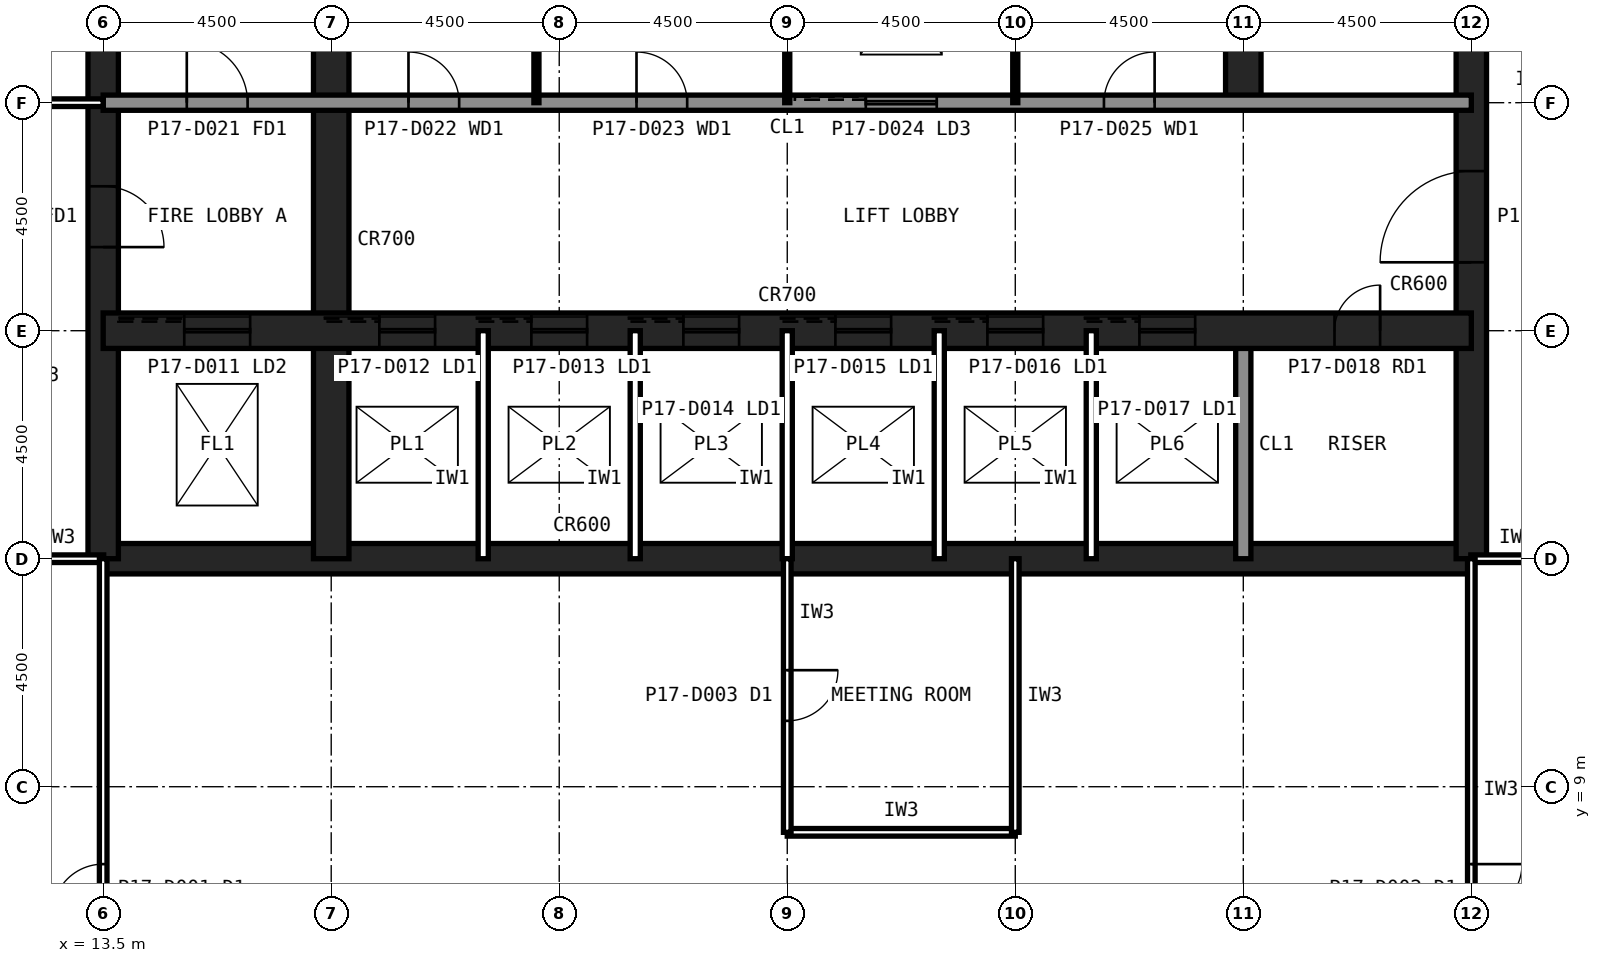
"""IFC4 building model, lengths in metres.
Left out: names, types, materials, properties, quantities, classifications, styles, units other than length and angle.
Written with IfcOpenShell. Run it as: python <this file> out.ifc"""

import sys

from ifc_helpers import new_model, si_unit, direction, frame, frame_2d, origin, place, context, subcontext, project, spatial, rectangle, extrude, element, fill, save


model = new_model("IFC4")
c1 = context("Model", 3, precision=1e-05, world=origin(), true_north=direction((0.0, 1.0)))
c2 = subcontext(c1, "Body", "Model", "MODEL_VIEW")
j1 = project(units=[si_unit("LENGTHUNIT", "METRE"), si_unit("PLANEANGLEUNIT", "RADIAN")], contexts=[c1])
p1 = place(None, origin())
s1 = spatial("IfcSite", under=j1, at=p1, CompositionType="ELEMENT")
p2 = place(p1, origin())
s2 = spatial("IfcBuilding", under=s1, at=p2, CompositionType="ELEMENT")
p3 = place(p2, frame((0.0, 0.0, 71.0)))
s3 = spatial("IfcBuildingStorey", under=s2, at=p3, CompositionType="ELEMENT", Elevation=71.0)
p4 = place(p3, frame((13.5, 13.5, 0.0), z_axis=(0.0, 0.0, 1.0), x_axis=(1.0, 0.0, 0.0)))
e1 = element("IfcWall", 1, at=p4, inside=s3, PredefinedType="SHEAR", context=c2, shape_type="SweptSolid", body=[
    extrude(rectangle(XDim=27.0, YDim=0.6, at=frame_2d((13.5, 0.0))), origin(), (0.0, 0.0, 1.0), 4.2),
])
p5 = place(p3, frame((40.5, 13.5, 0.0), z_axis=(0.0, 0.0, 1.0), x_axis=(0.0, 1.0, 0.0)))
e2 = element("IfcWall", 2, at=p5, inside=s3, PredefinedType="SHEAR", context=c2, shape_type="SweptSolid", body=[
    extrude(rectangle(XDim=27.0, YDim=0.6, at=frame_2d((13.5, 0.0))), origin(), (0.0, 0.0, 1.0), 4.2),
])
p6 = place(p5, frame((5.85, 0.0, 0.0)))
e3 = element("IfcOpeningElement", 3, at=p6, cuts=e2, PredefinedType="OPENING", context=c2, shape_type="SweptSolid", body=[
    extrude(rectangle(XDim=1.8, YDim=2.1, at=frame_2d((0.9, 1.05))), frame((0.0, 0.31, 0.0), z_axis=(0.0, -1.0, 0.0), x_axis=(1.0, 0.0, 0.0)), (0.0, 0.0, 1.0), 0.62),
])
p7 = place(p5, frame((19.65, 0.0, 0.0)))
e4 = element("IfcOpeningElement", 4, at=p7, cuts=e2, PredefinedType="OPENING", context=c2, shape_type="SweptSolid", body=[
    extrude(rectangle(XDim=1.2, YDim=2.1, at=frame_2d((0.6, 1.05))), frame((0.0, 0.31, 0.0), z_axis=(0.0, -1.0, 0.0), x_axis=(1.0, 0.0, 0.0)), (0.0, 0.0, 1.0), 0.62),
])
p8 = place(p3, frame((13.5, 40.5, 0.0), z_axis=(0.0, 0.0, 1.0), x_axis=(0.0, -1.0, 0.0)))
e5 = element("IfcWall", 5, at=p8, inside=s3, PredefinedType="SHEAR", context=c2, shape_type="SweptSolid", body=[
    extrude(rectangle(XDim=27.0, YDim=0.6, at=frame_2d((13.5, 0.0))), origin(), (0.0, 0.0, 1.0), 4.2),
])
p9 = place(p8, frame((19.65, 0.0, 0.0)))
e6 = element("IfcOpeningElement", 6, at=p9, cuts=e5, PredefinedType="OPENING", context=c2, shape_type="SweptSolid", body=[
    extrude(rectangle(XDim=1.2, YDim=2.1, at=frame_2d((0.6, 1.05))), frame((0.0, 0.31, 0.0), z_axis=(0.0, -1.0, 0.0), x_axis=(1.0, 0.0, 0.0)), (0.0, 0.0, 1.0), 0.62),
])
p10 = place(p8, frame((5.85, 0.0, 0.0)))
e7 = element("IfcOpeningElement", 7, at=p10, cuts=e5, PredefinedType="OPENING", context=c2, shape_type="SweptSolid", body=[
    extrude(rectangle(XDim=1.8, YDim=2.1, at=frame_2d((0.9, 1.05))), frame((0.0, 0.31, 0.0), z_axis=(0.0, -1.0, 0.0), x_axis=(1.0, 0.0, 0.0)), (0.0, 0.0, 1.0), 0.62),
])
p11 = place(p3, frame((18.0, 13.5, 0.0), z_axis=(0.0, 0.0, 1.0), x_axis=(0.0, 1.0, 0.0)))
e8 = element("IfcWall", 8, at=p11, inside=s3, PredefinedType="SHEAR", context=c2, shape_type="SweptSolid", body=[
    extrude(rectangle(XDim=18.0, YDim=0.7, at=frame_2d((9.0, 0.0))), origin(), (0.0, 0.0, 1.0), 4.2),
])
p12 = place(p3, frame((36.0, 13.5, 0.0), z_axis=(0.0, 0.0, 1.0), x_axis=(0.0, 1.0, 0.0)))
e9 = element("IfcWall", 9, at=p12, inside=s3, PredefinedType="SOLIDWALL", context=c2, shape_type="SweptSolid", body=[
    extrude(rectangle(XDim=4.5, YDim=0.3, at=frame_2d((2.25, 0.0))), origin(), (0.0, 0.0, 1.0), 4.04),
])
p13 = place(p3, frame((36.0, 22.5, 0.0), z_axis=(0.0, 0.0, 1.0), x_axis=(0.0, 1.0, 0.0)))
e10 = element("IfcWall", 10, at=p13, inside=s3, PredefinedType="SHEAR", context=c2, shape_type="SweptSolid", body=[
    extrude(rectangle(XDim=18.0, YDim=0.7, at=frame_2d((9.0, 0.0))), origin(), (0.0, 0.0, 1.0), 4.2),
])
p14 = place(p3, frame((13.5, 18.0, 0.0), z_axis=(0.0, 0.0, 1.0), x_axis=(1.0, 0.0, 0.0)))
e11 = element("IfcWall", 11, at=p14, inside=s3, PredefinedType="SHEAR", context=c2, shape_type="SweptSolid", body=[
    extrude(rectangle(XDim=27.0, YDim=0.7, at=frame_2d((13.5, 0.0))), origin(), (0.0, 0.0, 1.0), 4.2),
])
p15 = place(p14, frame((24.3, 0.0, 0.0)))
e12 = element("IfcOpeningElement", 12, at=p15, cuts=e11, PredefinedType="OPENING", context=c2, shape_type="SweptSolid", body=[
    extrude(rectangle(XDim=0.9, YDim=2.1, at=frame_2d((0.45, 1.05))), frame((0.0, 0.36, 0.0), z_axis=(0.0, -1.0, 0.0), x_axis=(1.0, 0.0, 0.0)), (0.0, 0.0, 1.0), 0.72),
])
p16 = place(p14, frame((5.45, 0.0, 0.0)))
e13 = element("IfcOpeningElement", 13, at=p16, cuts=e11, PredefinedType="OPENING", context=c2, shape_type="SweptSolid", body=[
    extrude(rectangle(XDim=1.1, YDim=2.1, at=frame_2d((0.55, 1.05))), frame((0.0, 0.36, 0.0), z_axis=(0.0, -1.0, 0.0), x_axis=(1.0, 0.0, 0.0)), (0.0, 0.0, 1.0), 0.72),
])
p17 = place(p14, frame((8.45, 0.0, 0.0)))
e14 = element("IfcOpeningElement", 14, at=p17, cuts=e11, PredefinedType="OPENING", context=c2, shape_type="SweptSolid", body=[
    extrude(rectangle(XDim=1.1, YDim=2.1, at=frame_2d((0.55, 1.05))), frame((0.0, 0.36, 0.0), z_axis=(0.0, -1.0, 0.0), x_axis=(1.0, 0.0, 0.0)), (0.0, 0.0, 1.0), 0.72),
])
p18 = place(p14, frame((11.45, 0.0, 0.0)))
e15 = element("IfcOpeningElement", 15, at=p18, cuts=e11, PredefinedType="OPENING", context=c2, shape_type="SweptSolid", body=[
    extrude(rectangle(XDim=1.1, YDim=2.1, at=frame_2d((0.55, 1.05))), frame((0.0, 0.36, 0.0), z_axis=(0.0, -1.0, 0.0), x_axis=(1.0, 0.0, 0.0)), (0.0, 0.0, 1.0), 0.72),
])
p19 = place(p14, frame((14.45, 0.0, 0.0)))
e16 = element("IfcOpeningElement", 16, at=p19, cuts=e11, PredefinedType="OPENING", context=c2, shape_type="SweptSolid", body=[
    extrude(rectangle(XDim=1.1, YDim=2.1, at=frame_2d((0.55, 1.05))), frame((0.0, 0.36, 0.0), z_axis=(0.0, -1.0, 0.0), x_axis=(1.0, 0.0, 0.0)), (0.0, 0.0, 1.0), 0.72),
])
p20 = place(p14, frame((17.45, 0.0, 0.0)))
e17 = element("IfcOpeningElement", 17, at=p20, cuts=e11, PredefinedType="OPENING", context=c2, shape_type="SweptSolid", body=[
    extrude(rectangle(XDim=1.1, YDim=2.1, at=frame_2d((0.55, 1.05))), frame((0.0, 0.36, 0.0), z_axis=(0.0, -1.0, 0.0), x_axis=(1.0, 0.0, 0.0)), (0.0, 0.0, 1.0), 0.72),
])
p21 = place(p14, frame((20.45, 0.0, 0.0)))
e18 = element("IfcOpeningElement", 18, at=p21, cuts=e11, PredefinedType="OPENING", context=c2, shape_type="SweptSolid", body=[
    extrude(rectangle(XDim=1.1, YDim=2.1, at=frame_2d((0.55, 1.05))), frame((0.0, 0.36, 0.0), z_axis=(0.0, -1.0, 0.0), x_axis=(1.0, 0.0, 0.0)), (0.0, 0.0, 1.0), 0.72),
])
p22 = place(p14, frame((1.6, 0.0, 0.0)))
e19 = element("IfcOpeningElement", 19, at=p22, cuts=e11, PredefinedType="OPENING", context=c2, shape_type="SweptSolid", body=[
    extrude(rectangle(XDim=1.3, YDim=2.2, at=frame_2d((0.65, 1.1))), frame((0.0, 0.36, 0.0), z_axis=(0.0, -1.0, 0.0), x_axis=(1.0, 0.0, 0.0)), (0.0, 0.0, 1.0), 0.72),
])
p23 = place(p3, frame((13.5, 22.5, 0.0), z_axis=(0.0, 0.0, 1.0), x_axis=(1.0, 0.0, 0.0)))
e20 = element("IfcWall", 20, at=p23, inside=s3, PredefinedType="SOLIDWALL", context=c2, shape_type="SweptSolid", body=[
    extrude(rectangle(XDim=27.0, YDim=0.3, at=frame_2d((13.5, 0.0))), origin(), (0.0, 0.0, 1.0), 4.04),
])
p24 = place(p23, frame((1.65, 0.0, 0.0)))
e21 = element("IfcOpeningElement", 21, at=p24, cuts=e20, PredefinedType="OPENING", context=c2, shape_type="SweptSolid", body=[
    extrude(rectangle(XDim=1.2, YDim=2.1, at=frame_2d((0.6, 1.05))), frame((0.0, 0.16, 0.0), z_axis=(0.0, -1.0, 0.0), x_axis=(1.0, 0.0, 0.0)), (0.0, 0.0, 1.0), 0.32),
])
p25 = place(p23, frame((6.025, 0.0, 0.0)))
e22 = element("IfcOpeningElement", 22, at=p25, cuts=e20, PredefinedType="OPENING", context=c2, shape_type="SweptSolid", body=[
    extrude(rectangle(XDim=1.0, YDim=2.1, at=frame_2d((0.5, 1.05))), frame((0.0, 0.16, 0.0), z_axis=(0.0, -1.0, 0.0), x_axis=(1.0, 0.0, 0.0)), (0.0, 0.0, 1.0), 0.32),
])
p26 = place(p23, frame((10.525, 0.0, 0.0)))
e23 = element("IfcOpeningElement", 23, at=p26, cuts=e20, PredefinedType="OPENING", context=c2, shape_type="SweptSolid", body=[
    extrude(rectangle(XDim=1.0, YDim=2.1, at=frame_2d((0.5, 1.05))), frame((0.0, 0.16, 0.0), z_axis=(0.0, -1.0, 0.0), x_axis=(1.0, 0.0, 0.0)), (0.0, 0.0, 1.0), 0.32),
])
p27 = place(p23, frame((19.75, 0.0, 0.0)))
e24 = element("IfcOpeningElement", 24, at=p27, cuts=e20, PredefinedType="OPENING", context=c2, shape_type="SweptSolid", body=[
    extrude(rectangle(XDim=1.0, YDim=2.1, at=frame_2d((0.5, 1.05))), frame((0.0, 0.16, 0.0), z_axis=(0.0, -1.0, 0.0), x_axis=(1.0, 0.0, 0.0)), (0.0, 0.0, 1.0), 0.32),
])
p28 = place(p23, frame((15.05, 0.0, 0.0)))
e25 = element("IfcOpeningElement", 25, at=p28, cuts=e20, PredefinedType="OPENING", context=c2, shape_type="SweptSolid", body=[
    extrude(rectangle(XDim=1.4, YDim=2.4, at=frame_2d((0.7, 1.2))), frame((0.0, 0.16, 0.0), z_axis=(0.0, -1.0, 0.0), x_axis=(1.0, 0.0, 0.0)), (0.0, 0.0, 1.0), 0.32),
])
for number, where, z_axis, x_axis in (
    (26, (21.0, 13.5, 0.0), (0.0, 0.0, 1.0), (0.0, 1.0, 0.0)),
    (27, (24.0, 13.5, 0.0), (0.0, 0.0, 1.0), (0.0, 1.0, 0.0)),
    (28, (27.0, 13.5, 0.0), (0.0, 0.0, 1.0), (0.0, 1.0, 0.0)),
    (29, (30.0, 13.5, 0.0), (0.0, 0.0, 1.0), (0.0, 1.0, 0.0)),
    (30, (33.0, 13.5, 0.0), (0.0, 0.0, 1.0), (0.0, 1.0, 0.0)),
):
    element("IfcWall", number, at=place(p3, frame(where, z_axis=z_axis, x_axis=x_axis)), inside=s3, PredefinedType="PARTITIONING", context=c2, shape_type="SweptSolid", body=[
        extrude(rectangle(XDim=4.5, YDim=0.2, at=frame_2d((2.25, 0.0))), origin(), (0.0, 0.0, 1.0), 4.04),
    ])
for number, where, z_axis, x_axis in (
    (31, (22.05, 22.5, 0.0), (0.0, 0.0, 1.0), (0.0, 1.0, 0.0)),
    (32, (27.0, 22.5, 0.0), (0.0, 0.0, 1.0), (0.0, 1.0, 0.0)),
    (33, (31.5, 22.5, 0.0), (0.0, 0.0, 1.0), (0.0, 1.0, 0.0)),
):
    element("IfcWall", number, at=place(p3, frame(where, z_axis=z_axis, x_axis=x_axis)), inside=s3, PredefinedType="PLUMBINGWALL", context=c2, shape_type="SweptSolid", body=[
        extrude(rectangle(XDim=9.0, YDim=0.1, at=frame_2d((4.5, 0.0))), origin(), (0.0, 0.0, 1.0), 4.04),
    ])
for number, where, z_axis, x_axis in (
    (34, (11.7, 13.5, 0.0), (0.0, 0.0, 1.0), (1.0, 0.0, 0.0)),
    (35, (40.49, 13.5, 0.0), (0.0, 0.0, 1.0), (1.0, 0.0, 0.0)),
):
    element("IfcWall", number, at=place(p3, frame(where, z_axis=z_axis, x_axis=x_axis)), inside=s3, PredefinedType="PARTITIONING", context=c2, shape_type="SweptSolid", body=[
        extrude(rectangle(XDim=1.81, YDim=0.15, at=frame_2d((0.905, 0.0))), origin(), (0.0, 0.0, 1.0), 3.189),
    ])
p29 = place(p3, frame((9.9, 22.5, 0.0), z_axis=(0.0, 0.0, 1.0), x_axis=(1.0, 0.0, 0.0)))
e36 = element("IfcWall", 36, at=p29, inside=s3, PredefinedType="PARTITIONING", context=c2, shape_type="SweptSolid", body=[
    extrude(rectangle(XDim=3.6, YDim=0.15, at=frame_2d((1.8, 0.0))), origin(), (0.0, 0.0, 1.0), 3.189),
])
p30 = place(p3, frame((27.0, 8.1, 0.0), z_axis=(0.0, 0.0, 1.0), x_axis=(1.0, 0.0, 0.0)))
e37 = element("IfcWall", 37, at=p30, inside=s3, PredefinedType="PARTITIONING", context=c2, shape_type="SweptSolid", body=[
    extrude(rectangle(XDim=4.5, YDim=0.15, at=frame_2d((2.25, 0.0))), origin(), (0.0, 0.0, 1.0), 4.04),
])
p31 = place(p3, frame((31.5, 8.1, 0.0), z_axis=(0.0, 0.0, 1.0), x_axis=(0.0, 1.0, 0.0)))
e38 = element("IfcWall", 38, at=p31, inside=s3, PredefinedType="PARTITIONING", context=c2, shape_type="SweptSolid", body=[
    extrude(rectangle(XDim=5.4, YDim=0.15, at=frame_2d((2.7, 0.0))), origin(), (0.0, 0.0, 1.0), 3.189),
])
p32 = place(p3, frame((27.0, 13.5, 0.0), z_axis=(0.0, 0.0, 1.0), x_axis=(0.0, -1.0, 0.0)))
e39 = element("IfcWall", 39, at=p32, inside=s3, PredefinedType="PARTITIONING", context=c2, shape_type="SweptSolid", body=[
    extrude(rectangle(XDim=5.4, YDim=0.15, at=frame_2d((2.7, 0.0))), origin(), (0.0, 0.0, 1.0), 3.189),
])
p33 = place(p32, frame((2.2, 0.0, 0.0)))
e40 = element("IfcOpeningElement", 40, at=p33, cuts=e39, PredefinedType="OPENING", context=c2, shape_type="SweptSolid", body=[
    extrude(rectangle(XDim=1.0, YDim=2.1, at=frame_2d((0.5, 1.05))), frame((0.0, 0.085, 0.0), z_axis=(0.0, -1.0, 0.0), x_axis=(1.0, 0.0, 0.0)), (0.0, 0.0, 1.0), 0.17),
])
p34 = place(p3, frame((13.5, 0.445, 0.0), z_axis=(0.0, 0.0, 1.0), x_axis=(0.0, 1.0, 0.0)))
e41 = element("IfcWall", 41, at=p34, inside=s3, PredefinedType="PARTITIONING", context=c2, shape_type="SweptSolid", body=[
    extrude(rectangle(XDim=13.055, YDim=0.15, at=frame_2d((6.527, 0.0))), origin(), (0.0, 0.0, 1.0), 3.189),
])
p35 = place(p34, frame((6.028, 0.0, 0.0)))
e42 = element("IfcOpeningElement", 42, at=p35, cuts=e41, PredefinedType="OPENING", context=c2, shape_type="SweptSolid", body=[
    extrude(rectangle(XDim=1.0, YDim=2.1, at=frame_2d((0.5, 1.05))), frame((0.0, 0.085, 0.0), z_axis=(0.0, -1.0, 0.0), x_axis=(1.0, 0.0, 0.0)), (0.0, 0.0, 1.0), 0.17),
])
p36 = place(p3, frame((40.5, 13.5, 0.0), z_axis=(0.0, 0.0, 1.0), x_axis=(0.0, -1.0, 0.0)))
e43 = element("IfcWall", 43, at=p36, inside=s3, PredefinedType="PARTITIONING", context=c2, shape_type="SweptSolid", body=[
    extrude(rectangle(XDim=13.055, YDim=0.15, at=frame_2d((6.527, 0.0))), origin(), (0.0, 0.0, 1.0), 3.189),
])
p37 = place(p36, frame((6.028, 0.0, 0.0)))
e44 = element("IfcOpeningElement", 44, at=p37, cuts=e43, PredefinedType="OPENING", context=c2, shape_type="SweptSolid", body=[
    extrude(rectangle(XDim=1.0, YDim=2.1, at=frame_2d((0.5, 1.05))), frame((0.0, 0.085, 0.0), z_axis=(0.0, -1.0, 0.0), x_axis=(1.0, 0.0, 0.0)), (0.0, 0.0, 1.0), 0.17),
])
p38 = place(p9, origin())
e45 = element("IfcDoor", 45, at=p38, inside=s3, OperationType="SINGLE_SWING_RIGHT", PredefinedType="DOOR", context=c2, shape_type="SweptSolid", body=[
    extrude(rectangle(XDim=1.2, YDim=2.1, at=frame_2d((0.6, 1.05))), frame((0.0, 0.025, 0.0), z_axis=(0.0, -1.0, 0.0), x_axis=(1.0, 0.0, 0.0)), (0.0, 0.0, 1.0), 0.05),
])
fill(e6, e45)
p39 = place(p6, origin())
e46 = element("IfcDoor", 46, at=p39, inside=s3, OperationType="SINGLE_SWING_LEFT", PredefinedType="DOOR", context=c2, shape_type="SweptSolid", body=[
    extrude(rectangle(XDim=1.8, YDim=2.1, at=frame_2d((0.9, 1.05))), frame((0.0, 0.025, 0.0), z_axis=(0.0, -1.0, 0.0), x_axis=(1.0, 0.0, 0.0)), (0.0, 0.0, 1.0), 0.05),
])
fill(e3, e46)
p40 = place(p24, origin())
e47 = element("IfcDoor", 47, at=p40, inside=s3, OperationType="SINGLE_SWING_LEFT", PredefinedType="DOOR", context=c2, shape_type="SweptSolid", body=[
    extrude(rectangle(XDim=1.2, YDim=2.1, at=frame_2d((0.6, 1.05))), frame((0.0, 0.025, 0.0), z_axis=(0.0, -1.0, 0.0), x_axis=(1.0, 0.0, 0.0)), (0.0, 0.0, 1.0), 0.05),
])
fill(e21, e47)
p41 = place(p25, origin())
e48 = element("IfcDoor", 48, at=p41, inside=s3, OperationType="SINGLE_SWING_LEFT", PredefinedType="DOOR", context=c2, shape_type="SweptSolid", body=[
    extrude(rectangle(XDim=1.0, YDim=2.1, at=frame_2d((0.5, 1.05))), frame((0.0, 0.025, 0.0), z_axis=(0.0, -1.0, 0.0), x_axis=(1.0, 0.0, 0.0)), (0.0, 0.0, 1.0), 0.05),
])
fill(e22, e48)
p42 = place(p26, origin())
e49 = element("IfcDoor", 49, at=p42, inside=s3, OperationType="SINGLE_SWING_LEFT", PredefinedType="DOOR", context=c2, shape_type="SweptSolid", body=[
    extrude(rectangle(XDim=1.0, YDim=2.1, at=frame_2d((0.5, 1.05))), frame((0.0, 0.025, 0.0), z_axis=(0.0, -1.0, 0.0), x_axis=(1.0, 0.0, 0.0)), (0.0, 0.0, 1.0), 0.05),
])
fill(e23, e49)
p43 = place(p27, origin())
e50 = element("IfcDoor", 50, at=p43, inside=s3, OperationType="SINGLE_SWING_RIGHT", PredefinedType="DOOR", context=c2, shape_type="SweptSolid", body=[
    extrude(rectangle(XDim=1.0, YDim=2.1, at=frame_2d((0.5, 1.05))), frame((0.0, 0.025, 0.0), z_axis=(0.0, -1.0, 0.0), x_axis=(1.0, 0.0, 0.0)), (0.0, 0.0, 1.0), 0.05),
])
fill(e24, e50)
p44 = place(p15, origin())
e51 = element("IfcDoor", 51, at=p44, inside=s3, OperationType="SINGLE_SWING_RIGHT", PredefinedType="DOOR", context=c2, shape_type="SweptSolid", body=[
    extrude(rectangle(XDim=0.9, YDim=2.1, at=frame_2d((0.45, 1.05))), frame((0.0, 0.025, 0.0), z_axis=(0.0, -1.0, 0.0), x_axis=(1.0, 0.0, 0.0)), (0.0, 0.0, 1.0), 0.05),
])
fill(e12, e51)
p45 = place(p16, origin())
e52 = element("IfcDoor", 52, at=p45, inside=s3, OperationType="SLIDING_TO_LEFT", PredefinedType="DOOR", context=c2, shape_type="SweptSolid", body=[
    extrude(rectangle(XDim=1.1, YDim=2.1, at=frame_2d((0.55, 1.05))), frame((0.0, 0.025, 0.0), z_axis=(0.0, -1.0, 0.0), x_axis=(1.0, 0.0, 0.0)), (0.0, 0.0, 1.0), 0.05),
])
fill(e13, e52)
p46 = place(p17, origin())
e53 = element("IfcDoor", 53, at=p46, inside=s3, OperationType="SLIDING_TO_LEFT", PredefinedType="DOOR", context=c2, shape_type="SweptSolid", body=[
    extrude(rectangle(XDim=1.1, YDim=2.1, at=frame_2d((0.55, 1.05))), frame((0.0, 0.025, 0.0), z_axis=(0.0, -1.0, 0.0), x_axis=(1.0, 0.0, 0.0)), (0.0, 0.0, 1.0), 0.05),
])
fill(e14, e53)
p47 = place(p18, origin())
e54 = element("IfcDoor", 54, at=p47, inside=s3, OperationType="SLIDING_TO_LEFT", PredefinedType="DOOR", context=c2, shape_type="SweptSolid", body=[
    extrude(rectangle(XDim=1.1, YDim=2.1, at=frame_2d((0.55, 1.05))), frame((0.0, 0.025, 0.0), z_axis=(0.0, -1.0, 0.0), x_axis=(1.0, 0.0, 0.0)), (0.0, 0.0, 1.0), 0.05),
])
fill(e15, e54)
p48 = place(p19, origin())
e55 = element("IfcDoor", 55, at=p48, inside=s3, OperationType="SLIDING_TO_LEFT", PredefinedType="DOOR", context=c2, shape_type="SweptSolid", body=[
    extrude(rectangle(XDim=1.1, YDim=2.1, at=frame_2d((0.55, 1.05))), frame((0.0, 0.025, 0.0), z_axis=(0.0, -1.0, 0.0), x_axis=(1.0, 0.0, 0.0)), (0.0, 0.0, 1.0), 0.05),
])
fill(e16, e55)
p49 = place(p20, origin())
e56 = element("IfcDoor", 56, at=p49, inside=s3, OperationType="SLIDING_TO_LEFT", PredefinedType="DOOR", context=c2, shape_type="SweptSolid", body=[
    extrude(rectangle(XDim=1.1, YDim=2.1, at=frame_2d((0.55, 1.05))), frame((0.0, 0.025, 0.0), z_axis=(0.0, -1.0, 0.0), x_axis=(1.0, 0.0, 0.0)), (0.0, 0.0, 1.0), 0.05),
])
fill(e17, e56)
p50 = place(p21, origin())
e57 = element("IfcDoor", 57, at=p50, inside=s3, OperationType="SLIDING_TO_LEFT", PredefinedType="DOOR", context=c2, shape_type="SweptSolid", body=[
    extrude(rectangle(XDim=1.1, YDim=2.1, at=frame_2d((0.55, 1.05))), frame((0.0, 0.025, 0.0), z_axis=(0.0, -1.0, 0.0), x_axis=(1.0, 0.0, 0.0)), (0.0, 0.0, 1.0), 0.05),
])
fill(e18, e57)
p51 = place(p22, origin())
e58 = element("IfcDoor", 58, at=p51, inside=s3, OperationType="SLIDING_TO_LEFT", PredefinedType="DOOR", context=c2, shape_type="SweptSolid", body=[
    extrude(rectangle(XDim=1.3, YDim=2.2, at=frame_2d((0.65, 1.1))), frame((0.0, 0.025, 0.0), z_axis=(0.0, -1.0, 0.0), x_axis=(1.0, 0.0, 0.0)), (0.0, 0.0, 1.0), 0.05),
])
fill(e19, e58)
p52 = place(p28, origin())
e59 = element("IfcDoor", 59, at=p52, inside=s3, OperationType="SLIDING_TO_LEFT", PredefinedType="DOOR", context=c2, shape_type="SweptSolid", body=[
    extrude(rectangle(XDim=1.4, YDim=2.4, at=frame_2d((0.7, 1.2))), frame((0.0, 0.025, 0.0), z_axis=(0.0, -1.0, 0.0), x_axis=(1.0, 0.0, 0.0)), (0.0, 0.0, 1.0), 0.05),
])
fill(e25, e59)
p53 = place(p33, origin())
e60 = element("IfcDoor", 60, at=p53, inside=s3, OperationType="SINGLE_SWING_LEFT", PredefinedType="DOOR", context=c2, shape_type="SweptSolid", body=[
    extrude(rectangle(XDim=1.0, YDim=2.1, at=frame_2d((0.5, 1.05))), frame((0.0, 0.025, 0.0), z_axis=(0.0, -1.0, 0.0), x_axis=(1.0, 0.0, 0.0)), (0.0, 0.0, 1.0), 0.05),
])
fill(e40, e60)
p54 = place(p35, origin())
e61 = element("IfcDoor", 61, at=p54, inside=s3, OperationType="SINGLE_SWING_LEFT", PredefinedType="DOOR", context=c2, shape_type="SweptSolid", body=[
    extrude(rectangle(XDim=1.0, YDim=2.1, at=frame_2d((0.5, 1.05))), frame((0.0, 0.025, 0.0), z_axis=(0.0, -1.0, 0.0), x_axis=(1.0, 0.0, 0.0)), (0.0, 0.0, 1.0), 0.05),
])
fill(e42, e61)
p55 = place(p37, origin())
e62 = element("IfcDoor", 62, at=p55, inside=s3, OperationType="SINGLE_SWING_LEFT", PredefinedType="DOOR", context=c2, shape_type="SweptSolid", body=[
    extrude(rectangle(XDim=1.0, YDim=2.1, at=frame_2d((0.5, 1.05))), frame((0.0, 0.025, 0.0), z_axis=(0.0, -1.0, 0.0), x_axis=(1.0, 0.0, 0.0)), (0.0, 0.0, 1.0), 0.05),
])
fill(e44, e62)
save(model, sys.argv[1])
